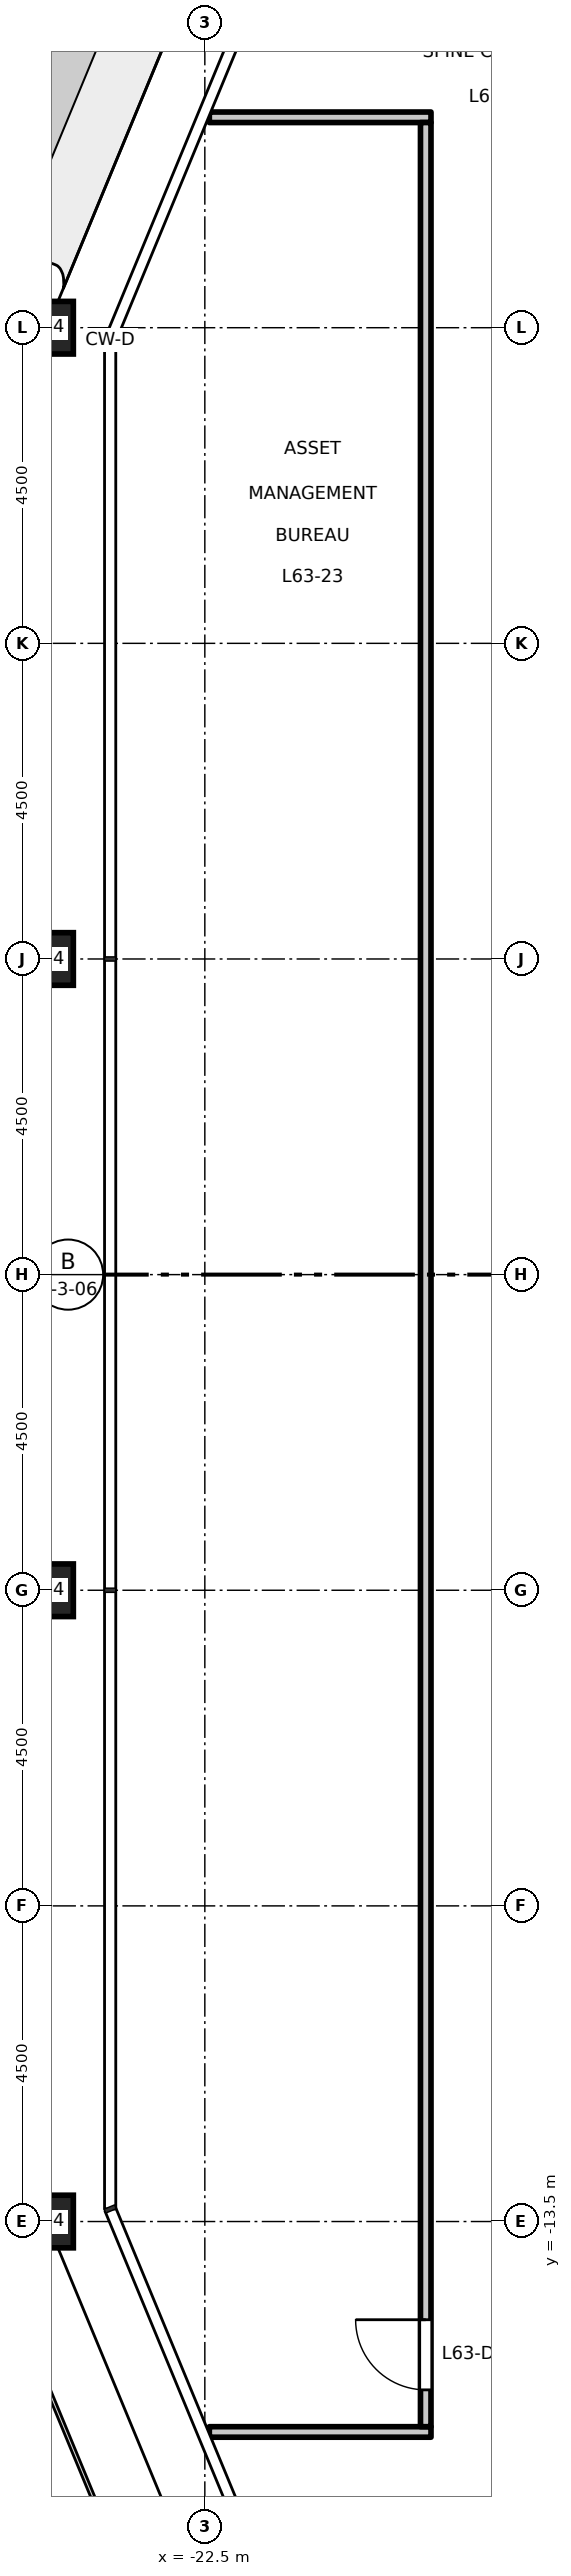
"""IFC4 building model, lengths in metres.
Left out: names, types, materials, properties, quantities, classifications, styles, units other than length and angle.
Written with IfcOpenShell. Run it as: python <this file> out.ifc"""

import sys

from ifc_helpers import new_model, si_unit, direction, frame, frame_2d, origin, origin_2d, place, context, subcontext, project, spatial, rectangle, hollow_rectangle, extrude, element, fill, save


model = new_model("IFC4")
c1 = context("Model", 3, precision=1e-05, world=origin(), true_north=direction((0.0, 1.0)))
c2 = subcontext(c1, "Body", "Model", "MODEL_VIEW")
j1 = project(units=[si_unit("LENGTHUNIT", "METRE"), si_unit("PLANEANGLEUNIT", "RADIAN")], contexts=[c1])
p1 = place(None, origin())
s1 = spatial("IfcSite", under=j1, at=p1, CompositionType="ELEMENT")
p2 = place(p1, origin())
s2 = spatial("IfcBuilding", under=s1, at=p2, CompositionType="ELEMENT")
p3 = place(p2, frame((0.0, 0.0, 294.2)))
s3 = spatial("IfcBuildingStorey", under=s2, at=p3, CompositionType="ELEMENT", Elevation=294.2)
for number, where, z_axis, x_axis in (
    (1, (-24.75, 13.5, 0.0), (0.0, 0.0, 1.0), (1.0, 0.0, 0.0)),
    (2, (-24.75, 4.5, 0.0), (0.0, 0.0, 1.0), (1.0, 0.0, 0.0)),
    (3, (-24.75, -4.5, 0.0), (0.0, 0.0, 1.0), (1.0, 0.0, 0.0)),
    (4, (-24.75, -13.5, 0.0), (0.0, 0.0, 1.0), (1.0, 0.0, 0.0)),
):
    element("IfcColumn", number, at=place(p3, frame(where, z_axis=z_axis, x_axis=x_axis)), inside=s3, PredefinedType="COLUMN", context=c2, shape_type="SweptSolid", body=[
        extrude(hollow_rectangle(XDim=0.75, YDim=0.75, WallThickness=0.04, at=origin_2d()), origin(), (0.0, 0.0, 1.0), 4.5),
    ])
for number, where, z_axis, x_axis in (
    (5, (-22.436, -16.5, 0.0), (0.0, 0.0, 1.0), (1.0, 0.0, 0.0)),
    (6, (-22.436, 16.5, 0.0), (0.0, 0.0, 1.0), (1.0, 0.0, 0.0)),
):
    element("IfcWall", number, at=place(p3, frame(where, z_axis=z_axis, x_axis=x_axis)), inside=s3, PredefinedType="PARTITIONING", context=c2, shape_type="SweptSolid", body=[
        extrude(rectangle(XDim=3.161, YDim=0.15, at=frame_2d((1.581, 0.0))), origin(), (0.0, 0.0, 1.0), 4.35),
    ])
p4 = place(p3, frame((-19.35, -16.425, 0.0), z_axis=(0.0, 0.0, 1.0), x_axis=(0.0, 1.0, 0.0)))
e7 = element("IfcWall", 7, at=p4, inside=s3, PredefinedType="PARTITIONING", context=c2, shape_type="SweptSolid", body=[
    extrude(rectangle(XDim=32.85, YDim=0.15, at=frame_2d((16.425, 0.0))), origin(), (0.0, 0.0, 1.0), 4.35),
])
p5 = place(p4, frame((0.525, 0.0, 0.0)))
e8 = element("IfcOpeningElement", 8, at=p5, cuts=e7, PredefinedType="OPENING", context=c2, shape_type="SweptSolid", body=[
    extrude(rectangle(XDim=1.0, YDim=2.1, at=frame_2d((0.5, 1.05))), frame((0.0, 0.085, 0.0), z_axis=(0.0, -1.0, 0.0), x_axis=(1.0, 0.0, 0.0)), (0.0, 0.0, 1.0), 0.17),
])
p6 = place(p5, origin())
e9 = element("IfcDoor", 9, at=p6, inside=s3, OperationType="SINGLE_SWING_RIGHT", PredefinedType="DOOR", context=c2, shape_type="SweptSolid", body=[
    extrude(rectangle(XDim=1.0, YDim=2.1, at=frame_2d((0.5, 1.05))), frame((0.0, 0.025, 0.0), z_axis=(0.0, -1.0, 0.0), x_axis=(1.0, 0.0, 0.0)), (0.0, 0.0, 1.0), 0.05),
])
fill(e8, e9)
save(model, sys.argv[1])
